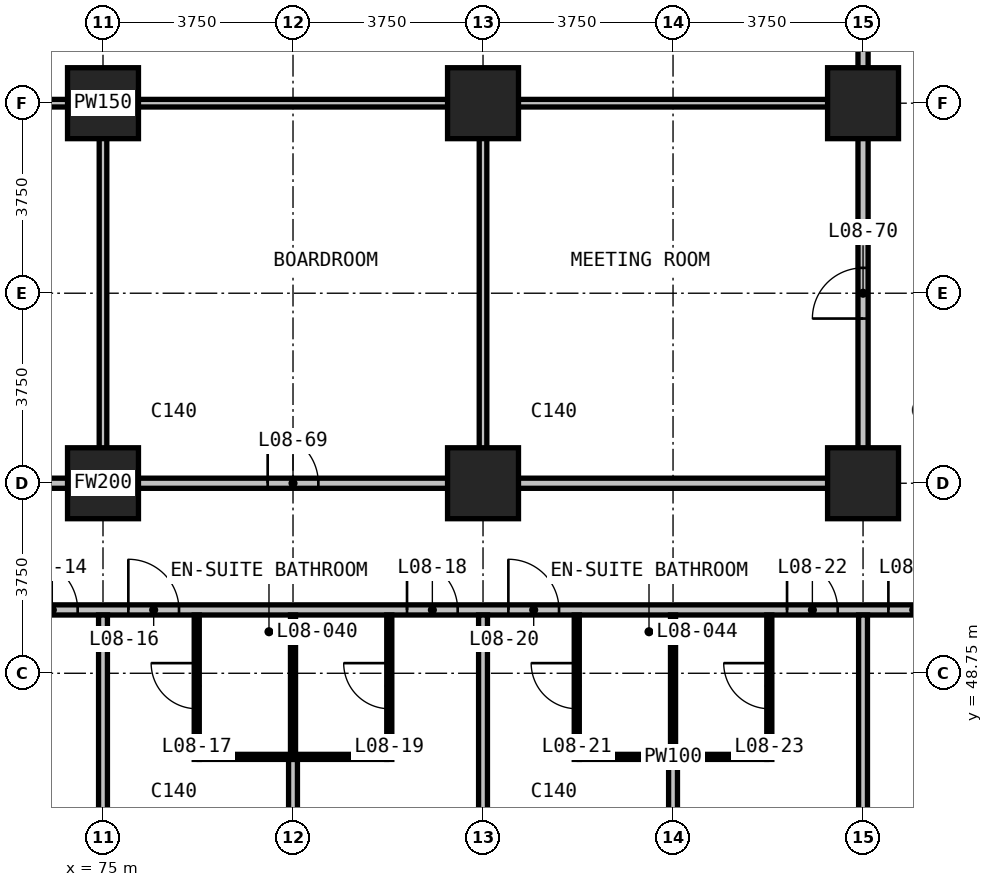
"""IFC4 building model, lengths in metres.
Left out: names, types, materials, properties, quantities, classifications, styles, units other than length and angle.
Written with IfcOpenShell. Run it as: python <this file> out.ifc"""

import sys

from ifc_helpers import new_model, si_unit, direction, frame, frame_2d, origin, origin_2d, place, context, subcontext, project, spatial, rectangle, extrude, element, fill, save


model = new_model("IFC4")
c1 = context("Model", 3, precision=1e-05, world=origin(), true_north=direction((0.0, 1.0)))
c2 = subcontext(c1, "Body", "Model", "MODEL_VIEW")
j1 = project(units=[si_unit("LENGTHUNIT", "METRE"), si_unit("PLANEANGLEUNIT", "RADIAN")], contexts=[c1])
p1 = place(None, origin())
s1 = spatial("IfcSite", under=j1, at=p1, CompositionType="ELEMENT")
p2 = place(p1, origin())
s2 = spatial("IfcBuilding", under=s1, at=p2, CompositionType="ELEMENT")
p3 = place(p2, frame((0.0, 0.0, 46.1)))
s3 = spatial("IfcBuildingStorey", under=s2, at=p3, CompositionType="ELEMENT", Elevation=46.1)
for number, where, z_axis, x_axis in (
    (1, (75.0, 52.5, 0.0), (0.0, 0.0, 1.0), (1.0, 0.0, 0.0)),
    (2, (75.0, 60.0, 0.0), (0.0, 0.0, 1.0), (1.0, 0.0, 0.0)),
    (3, (82.5, 52.5, 0.0), (0.0, 0.0, 1.0), (1.0, 0.0, 0.0)),
    (4, (82.5, 60.0, 0.0), (0.0, 0.0, 1.0), (1.0, 0.0, 0.0)),
    (5, (90.0, 52.5, 0.0), (0.0, 0.0, 1.0), (1.0, 0.0, 0.0)),
    (6, (90.0, 60.0, 0.0), (0.0, 0.0, 1.0), (1.0, 0.0, 0.0)),
):
    element("IfcColumn", number, at=place(p3, frame(where, z_axis=z_axis, x_axis=x_axis)), inside=s3, PredefinedType="COLUMN", context=c2, shape_type="SweptSolid", body=[
        extrude(rectangle(XDim=1.4, YDim=1.4, at=origin_2d()), origin(), (0.0, 0.0, 1.0), 3.3),
    ])
p4 = place(p3, frame((52.575, 50.0, 0.0), z_axis=(0.0, 0.0, 1.0), x_axis=(1.0, 0.0, 0.0)))
e7 = element("IfcWall", 7, at=p4, inside=s3, PredefinedType="PARTITIONING", context=c2, shape_type="SweptSolid", body=[
    extrude(rectangle(XDim=44.85, YDim=0.2, at=frame_2d((22.425, 0.0))), origin(), (0.0, 0.0, 1.0), 3.0),
])
p5 = place(p4, frame((5.925, 0.0, 0.0)))
e8 = element("IfcOpeningElement", 8, at=p5, cuts=e7, PredefinedType="OPENING", context=c2, shape_type="SweptSolid", body=[
    extrude(rectangle(XDim=1.0, YDim=2.2, at=frame_2d((0.5, 1.1))), frame((0.0, 0.11, 0.0), z_axis=(0.0, -1.0, 0.0), x_axis=(1.0, 0.0, 0.0)), (0.0, 0.0, 1.0), 0.22),
])
p6 = place(p4, frame((7.925, 0.0, 0.0)))
e9 = element("IfcOpeningElement", 9, at=p6, cuts=e7, PredefinedType="OPENING", context=c2, shape_type="SweptSolid", body=[
    extrude(rectangle(XDim=1.0, YDim=2.2, at=frame_2d((0.5, 1.1))), frame((0.0, 0.11, 0.0), z_axis=(0.0, -1.0, 0.0), x_axis=(1.0, 0.0, 0.0)), (0.0, 0.0, 1.0), 0.22),
])
p7 = place(p4, frame((13.425, 0.0, 0.0)))
e10 = element("IfcOpeningElement", 10, at=p7, cuts=e7, PredefinedType="OPENING", context=c2, shape_type="SweptSolid", body=[
    extrude(rectangle(XDim=1.0, YDim=2.2, at=frame_2d((0.5, 1.1))), frame((0.0, 0.11, 0.0), z_axis=(0.0, -1.0, 0.0), x_axis=(1.0, 0.0, 0.0)), (0.0, 0.0, 1.0), 0.22),
])
p8 = place(p4, frame((15.425, 0.0, 0.0)))
e11 = element("IfcOpeningElement", 11, at=p8, cuts=e7, PredefinedType="OPENING", context=c2, shape_type="SweptSolid", body=[
    extrude(rectangle(XDim=1.0, YDim=2.2, at=frame_2d((0.5, 1.1))), frame((0.0, 0.11, 0.0), z_axis=(0.0, -1.0, 0.0), x_axis=(1.0, 0.0, 0.0)), (0.0, 0.0, 1.0), 0.22),
])
p9 = place(p4, frame((20.925, 0.0, 0.0)))
e12 = element("IfcOpeningElement", 12, at=p9, cuts=e7, PredefinedType="OPENING", context=c2, shape_type="SweptSolid", body=[
    extrude(rectangle(XDim=1.0, YDim=2.2, at=frame_2d((0.5, 1.1))), frame((0.0, 0.11, 0.0), z_axis=(0.0, -1.0, 0.0), x_axis=(1.0, 0.0, 0.0)), (0.0, 0.0, 1.0), 0.22),
])
p10 = place(p4, frame((22.925, 0.0, 0.0)))
e13 = element("IfcOpeningElement", 13, at=p10, cuts=e7, PredefinedType="OPENING", context=c2, shape_type="SweptSolid", body=[
    extrude(rectangle(XDim=1.0, YDim=2.2, at=frame_2d((0.5, 1.1))), frame((0.0, 0.11, 0.0), z_axis=(0.0, -1.0, 0.0), x_axis=(1.0, 0.0, 0.0)), (0.0, 0.0, 1.0), 0.22),
])
p11 = place(p4, frame((28.425, 0.0, 0.0)))
e14 = element("IfcOpeningElement", 14, at=p11, cuts=e7, PredefinedType="OPENING", context=c2, shape_type="SweptSolid", body=[
    extrude(rectangle(XDim=1.0, YDim=2.2, at=frame_2d((0.5, 1.1))), frame((0.0, 0.11, 0.0), z_axis=(0.0, -1.0, 0.0), x_axis=(1.0, 0.0, 0.0)), (0.0, 0.0, 1.0), 0.22),
])
p12 = place(p4, frame((30.425, 0.0, 0.0)))
e15 = element("IfcOpeningElement", 15, at=p12, cuts=e7, PredefinedType="OPENING", context=c2, shape_type="SweptSolid", body=[
    extrude(rectangle(XDim=1.0, YDim=2.2, at=frame_2d((0.5, 1.1))), frame((0.0, 0.11, 0.0), z_axis=(0.0, -1.0, 0.0), x_axis=(1.0, 0.0, 0.0)), (0.0, 0.0, 1.0), 0.22),
])
p13 = place(p4, frame((35.925, 0.0, 0.0)))
e16 = element("IfcOpeningElement", 16, at=p13, cuts=e7, PredefinedType="OPENING", context=c2, shape_type="SweptSolid", body=[
    extrude(rectangle(XDim=1.0, YDim=2.2, at=frame_2d((0.5, 1.1))), frame((0.0, 0.11, 0.0), z_axis=(0.0, -1.0, 0.0), x_axis=(1.0, 0.0, 0.0)), (0.0, 0.0, 1.0), 0.22),
])
p14 = place(p4, frame((37.925, 0.0, 0.0)))
e17 = element("IfcOpeningElement", 17, at=p14, cuts=e7, PredefinedType="OPENING", context=c2, shape_type="SweptSolid", body=[
    extrude(rectangle(XDim=1.0, YDim=2.2, at=frame_2d((0.5, 1.1))), frame((0.0, 0.11, 0.0), z_axis=(0.0, -1.0, 0.0), x_axis=(1.0, 0.0, 0.0)), (0.0, 0.0, 1.0), 0.22),
])
p15 = place(p4, frame((1.4, 0.0, 0.0)))
e18 = element("IfcOpeningElement", 18, at=p15, cuts=e7, PredefinedType="OPENING", context=c2, shape_type="SweptSolid", body=[
    extrude(rectangle(XDim=0.9, YDim=2.2, at=frame_2d((0.45, 1.1))), frame((0.0, 0.11, 0.0), z_axis=(0.0, -1.0, 0.0), x_axis=(1.0, 0.0, 0.0)), (0.0, 0.0, 1.0), 0.22),
])
p16 = place(p4, frame((42.575, 0.0, 0.0)))
e19 = element("IfcOpeningElement", 19, at=p16, cuts=e7, PredefinedType="OPENING", context=c2, shape_type="SweptSolid", body=[
    extrude(rectangle(XDim=0.9, YDim=2.2, at=frame_2d((0.45, 1.1))), frame((0.0, 0.11, 0.0), z_axis=(0.0, -1.0, 0.0), x_axis=(1.0, 0.0, 0.0)), (0.0, 0.0, 1.0), 0.22),
])
p17 = place(p3, frame((60.1, 52.5, 0.0), z_axis=(0.0, 0.0, 1.0), x_axis=(1.0, 0.0, 0.0)))
e20 = element("IfcWall", 20, at=p17, inside=s3, PredefinedType="PARTITIONING", context=c2, shape_type="SweptSolid", body=[
    extrude(rectangle(XDim=29.8, YDim=0.2, at=frame_2d((14.9, 0.0))), origin(), (0.0, 0.0, 1.0), 3.0),
])
p18 = place(p17, frame((10.65, 0.0, 0.0)))
e21 = element("IfcOpeningElement", 21, at=p18, cuts=e20, PredefinedType="OPENING", context=c2, shape_type="SweptSolid", body=[
    extrude(rectangle(XDim=1.0, YDim=2.2, at=frame_2d((0.5, 1.1))), frame((0.0, 0.11, 0.0), z_axis=(0.0, -1.0, 0.0), x_axis=(1.0, 0.0, 0.0)), (0.0, 0.0, 1.0), 0.22),
])
p19 = place(p17, frame((18.15, 0.0, 0.0)))
e22 = element("IfcOpeningElement", 22, at=p19, cuts=e20, PredefinedType="OPENING", context=c2, shape_type="SweptSolid", body=[
    extrude(rectangle(XDim=1.0, YDim=2.2, at=frame_2d((0.5, 1.1))), frame((0.0, 0.11, 0.0), z_axis=(0.0, -1.0, 0.0), x_axis=(1.0, 0.0, 0.0)), (0.0, 0.0, 1.0), 0.22),
])
p20 = place(p3, frame((90.0, 52.4, 0.0), z_axis=(0.0, 0.0, 1.0), x_axis=(0.0, 1.0, 0.0)))
e23 = element("IfcWall", 23, at=p20, inside=s3, PredefinedType="PARTITIONING", context=c2, shape_type="SweptSolid", body=[
    extrude(rectangle(XDim=18.84, YDim=0.2, at=frame_2d((9.42, 0.0))), origin(), (0.0, 0.0, 1.0), 3.0),
])
p21 = place(p20, frame((3.35, 0.0, 0.0)))
e24 = element("IfcOpeningElement", 24, at=p21, cuts=e23, PredefinedType="OPENING", context=c2, shape_type="SweptSolid", body=[
    extrude(rectangle(XDim=1.0, YDim=2.2, at=frame_2d((0.5, 1.1))), frame((0.0, 0.11, 0.0), z_axis=(0.0, -1.0, 0.0), x_axis=(1.0, 0.0, 0.0)), (0.0, 0.0, 1.0), 0.22),
])
p22 = place(p20, frame((12.3, 0.0, 0.0)))
e25 = element("IfcOpeningElement", 25, at=p22, cuts=e23, PredefinedType="OPENING", context=c2, shape_type="SweptSolid", body=[
    extrude(rectangle(XDim=1.8, YDim=2.2, at=frame_2d((0.9, 1.1))), frame((0.0, 0.11, 0.0), z_axis=(0.0, -1.0, 0.0), x_axis=(1.0, 0.0, 0.0)), (0.0, 0.0, 1.0), 0.22),
])
p23 = place(p3, frame((75.0, 40.485, 0.0), z_axis=(0.0, 0.0, 1.0), x_axis=(0.0, 1.0, 0.0)))
e26 = element("IfcWall", 26, at=p23, inside=s3, PredefinedType="PARTITIONING", context=c2, shape_type="SweptSolid", body=[
    extrude(rectangle(XDim=9.415, YDim=0.175, at=frame_2d((4.708, 0.0))), origin(), (0.0, 0.0, 1.0), 3.0),
])
p24 = place(p3, frame((78.75, 40.485, 0.0), z_axis=(0.0, 0.0, 1.0), x_axis=(0.0, 1.0, 0.0)))
e27 = element("IfcWall", 27, at=p24, inside=s3, PredefinedType="PARTITIONING", context=c2, shape_type="SweptSolid", body=[
    extrude(rectangle(XDim=6.565, YDim=0.175, at=frame_2d((3.282, 0.0))), origin(), (0.0, 0.0, 1.0), 3.0),
])
p25 = place(p3, frame((82.5, 40.485, 0.0), z_axis=(0.0, 0.0, 1.0), x_axis=(0.0, 1.0, 0.0)))
e28 = element("IfcWall", 28, at=p25, inside=s3, PredefinedType="PARTITIONING", context=c2, shape_type="SweptSolid", body=[
    extrude(rectangle(XDim=9.415, YDim=0.175, at=frame_2d((4.708, 0.0))), origin(), (0.0, 0.0, 1.0), 3.0),
])
p26 = place(p3, frame((86.25, 40.485, 0.0), z_axis=(0.0, 0.0, 1.0), x_axis=(0.0, 1.0, 0.0)))
e29 = element("IfcWall", 29, at=p26, inside=s3, PredefinedType="PARTITIONING", context=c2, shape_type="SweptSolid", body=[
    extrude(rectangle(XDim=6.565, YDim=0.175, at=frame_2d((3.282, 0.0))), origin(), (0.0, 0.0, 1.0), 3.0),
])
p27 = place(p3, frame((90.0, 40.485, 0.0), z_axis=(0.0, 0.0, 1.0), x_axis=(0.0, 1.0, 0.0)))
e30 = element("IfcWall", 30, at=p27, inside=s3, PredefinedType="PARTITIONING", context=c2, shape_type="SweptSolid", body=[
    extrude(rectangle(XDim=9.415, YDim=0.175, at=frame_2d((4.708, 0.0))), origin(), (0.0, 0.0, 1.0), 3.0),
])
p28 = place(p3, frame((60.1, 60.0, 0.0), z_axis=(0.0, 0.0, 1.0), x_axis=(1.0, 0.0, 0.0)))
e31 = element("IfcWall", 31, at=p28, inside=s3, PredefinedType="PARTITIONING", context=c2, shape_type="SweptSolid", body=[
    extrude(rectangle(XDim=29.8, YDim=0.15, at=frame_2d((14.9, 0.0))), origin(), (0.0, 0.0, 1.0), 3.0),
])
for number, where, z_axis, x_axis in (
    (32, (75.0, 52.6, 0.0), (0.0, 0.0, 1.0), (0.0, 1.0, 0.0)),
    (33, (82.5, 52.6, 0.0), (0.0, 0.0, 1.0), (0.0, 1.0, 0.0)),
):
    element("IfcWall", number, at=place(p3, frame(where, z_axis=z_axis, x_axis=x_axis)), inside=s3, PredefinedType="PARTITIONING", context=c2, shape_type="SweptSolid", body=[
        extrude(rectangle(XDim=7.325, YDim=0.15, at=frame_2d((3.663, 0.0))), origin(), (0.0, 0.0, 1.0), 3.0),
    ])
for number, where, z_axis, x_axis in (
    (34, (76.9, 47.1, 0.0), (0.0, 0.0, 1.0), (1.0, 0.0, 0.0)),
    (35, (84.4, 47.1, 0.0), (0.0, 0.0, 1.0), (1.0, 0.0, 0.0)),
):
    element("IfcWall", number, at=place(p3, frame(where, z_axis=z_axis, x_axis=x_axis)), inside=s3, PredefinedType="PARTITIONING", context=c2, shape_type="SweptSolid", body=[
        extrude(rectangle(XDim=3.7, YDim=0.1, at=frame_2d((1.85, 0.0))), origin(), (0.0, 0.0, 1.0), 3.0),
    ])
p29 = place(p3, frame((76.85, 47.05, 0.0), z_axis=(0.0, 0.0, 1.0), x_axis=(0.0, 1.0, 0.0)))
e36 = element("IfcWall", 36, at=p29, inside=s3, PredefinedType="PARTITIONING", context=c2, shape_type="SweptSolid", body=[
    extrude(rectangle(XDim=2.85, YDim=0.1, at=frame_2d((1.425, 0.0))), origin(), (0.0, 0.0, 1.0), 3.0),
])
p30 = place(p29, frame((1.0, 0.0, 0.0)))
e37 = element("IfcOpeningElement", 37, at=p30, cuts=e36, PredefinedType="OPENING", context=c2, shape_type="SweptSolid", body=[
    extrude(rectangle(XDim=0.9, YDim=2.2, at=frame_2d((0.45, 1.1))), frame((0.0, 0.06, 0.0), z_axis=(0.0, -1.0, 0.0), x_axis=(1.0, 0.0, 0.0)), (0.0, 0.0, 1.0), 0.12),
])
p31 = place(p3, frame((78.75, 47.15, 0.0), z_axis=(0.0, 0.0, 1.0), x_axis=(0.0, 1.0, 0.0)))
e38 = element("IfcWall", 38, at=p31, inside=s3, PredefinedType="PARTITIONING", context=c2, shape_type="SweptSolid", body=[
    extrude(rectangle(XDim=2.75, YDim=0.1, at=frame_2d((1.375, 0.0))), origin(), (0.0, 0.0, 1.0), 3.0),
])
p32 = place(p3, frame((80.65, 47.05, 0.0), z_axis=(0.0, 0.0, 1.0), x_axis=(0.0, 1.0, 0.0)))
e39 = element("IfcWall", 39, at=p32, inside=s3, PredefinedType="PARTITIONING", context=c2, shape_type="SweptSolid", body=[
    extrude(rectangle(XDim=2.85, YDim=0.1, at=frame_2d((1.425, 0.0))), origin(), (0.0, 0.0, 1.0), 3.0),
])
p33 = place(p32, frame((1.0, 0.0, 0.0)))
e40 = element("IfcOpeningElement", 40, at=p33, cuts=e39, PredefinedType="OPENING", context=c2, shape_type="SweptSolid", body=[
    extrude(rectangle(XDim=0.9, YDim=2.2, at=frame_2d((0.45, 1.1))), frame((0.0, 0.06, 0.0), z_axis=(0.0, -1.0, 0.0), x_axis=(1.0, 0.0, 0.0)), (0.0, 0.0, 1.0), 0.12),
])
p34 = place(p3, frame((84.35, 47.05, 0.0), z_axis=(0.0, 0.0, 1.0), x_axis=(0.0, 1.0, 0.0)))
e41 = element("IfcWall", 41, at=p34, inside=s3, PredefinedType="PARTITIONING", context=c2, shape_type="SweptSolid", body=[
    extrude(rectangle(XDim=2.85, YDim=0.1, at=frame_2d((1.425, 0.0))), origin(), (0.0, 0.0, 1.0), 3.0),
])
p35 = place(p34, frame((1.0, 0.0, 0.0)))
e42 = element("IfcOpeningElement", 42, at=p35, cuts=e41, PredefinedType="OPENING", context=c2, shape_type="SweptSolid", body=[
    extrude(rectangle(XDim=0.9, YDim=2.2, at=frame_2d((0.45, 1.1))), frame((0.0, 0.06, 0.0), z_axis=(0.0, -1.0, 0.0), x_axis=(1.0, 0.0, 0.0)), (0.0, 0.0, 1.0), 0.12),
])
p36 = place(p3, frame((86.25, 47.15, 0.0), z_axis=(0.0, 0.0, 1.0), x_axis=(0.0, 1.0, 0.0)))
e43 = element("IfcWall", 43, at=p36, inside=s3, PredefinedType="PARTITIONING", context=c2, shape_type="SweptSolid", body=[
    extrude(rectangle(XDim=2.75, YDim=0.1, at=frame_2d((1.375, 0.0))), origin(), (0.0, 0.0, 1.0), 3.0),
])
p37 = place(p3, frame((88.15, 47.05, 0.0), z_axis=(0.0, 0.0, 1.0), x_axis=(0.0, 1.0, 0.0)))
e44 = element("IfcWall", 44, at=p37, inside=s3, PredefinedType="PARTITIONING", context=c2, shape_type="SweptSolid", body=[
    extrude(rectangle(XDim=2.85, YDim=0.1, at=frame_2d((1.425, 0.0))), origin(), (0.0, 0.0, 1.0), 3.0),
])
p38 = place(p37, frame((1.0, 0.0, 0.0)))
e45 = element("IfcOpeningElement", 45, at=p38, cuts=e44, PredefinedType="OPENING", context=c2, shape_type="SweptSolid", body=[
    extrude(rectangle(XDim=0.9, YDim=2.2, at=frame_2d((0.45, 1.1))), frame((0.0, 0.06, 0.0), z_axis=(0.0, -1.0, 0.0), x_axis=(1.0, 0.0, 0.0)), (0.0, 0.0, 1.0), 0.12),
])
p39 = place(p9, origin())
e46 = element("IfcDoor", 46, at=p39, inside=s3, OperationType="SINGLE_SWING_LEFT", PredefinedType="DOOR", context=c2, shape_type="SweptSolid", body=[
    extrude(rectangle(XDim=1.0, YDim=2.2, at=frame_2d((0.5, 1.1))), frame((0.0, 0.025, 0.0), z_axis=(0.0, -1.0, 0.0), x_axis=(1.0, 0.0, 0.0)), (0.0, 0.0, 1.0), 0.05),
])
fill(e12, e46)
p40 = place(p10, origin())
e47 = element("IfcDoor", 47, at=p40, inside=s3, OperationType="SINGLE_SWING_LEFT", PredefinedType="DOOR", context=c2, shape_type="SweptSolid", body=[
    extrude(rectangle(XDim=1.0, YDim=2.2, at=frame_2d((0.5, 1.1))), frame((0.0, 0.025, 0.0), z_axis=(0.0, -1.0, 0.0), x_axis=(1.0, 0.0, 0.0)), (0.0, 0.0, 1.0), 0.05),
])
fill(e13, e47)
p41 = place(p30, origin())
e48 = element("IfcDoor", 48, at=p41, inside=s3, OperationType="SINGLE_SWING_RIGHT", PredefinedType="DOOR", context=c2, shape_type="SweptSolid", body=[
    extrude(rectangle(XDim=0.9, YDim=2.2, at=frame_2d((0.45, 1.1))), frame((0.0, 0.025, 0.0), z_axis=(0.0, -1.0, 0.0), x_axis=(1.0, 0.0, 0.0)), (0.0, 0.0, 1.0), 0.05),
])
fill(e37, e48)
p42 = place(p11, origin())
e49 = element("IfcDoor", 49, at=p42, inside=s3, OperationType="SINGLE_SWING_LEFT", PredefinedType="DOOR", context=c2, shape_type="SweptSolid", body=[
    extrude(rectangle(XDim=1.0, YDim=2.2, at=frame_2d((0.5, 1.1))), frame((0.0, 0.025, 0.0), z_axis=(0.0, -1.0, 0.0), x_axis=(1.0, 0.0, 0.0)), (0.0, 0.0, 1.0), 0.05),
])
fill(e14, e49)
p43 = place(p33, origin())
e50 = element("IfcDoor", 50, at=p43, inside=s3, OperationType="SINGLE_SWING_RIGHT", PredefinedType="DOOR", context=c2, shape_type="SweptSolid", body=[
    extrude(rectangle(XDim=0.9, YDim=2.2, at=frame_2d((0.45, 1.1))), frame((0.0, 0.025, 0.0), z_axis=(0.0, -1.0, 0.0), x_axis=(1.0, 0.0, 0.0)), (0.0, 0.0, 1.0), 0.05),
])
fill(e40, e50)
p44 = place(p12, origin())
e51 = element("IfcDoor", 51, at=p44, inside=s3, OperationType="SINGLE_SWING_RIGHT", PredefinedType="DOOR", context=c2, shape_type="SweptSolid", body=[
    extrude(rectangle(XDim=1.0, YDim=2.2, at=frame_2d((0.5, 1.1))), frame((0.0, 0.025, 0.0), z_axis=(0.0, -1.0, 0.0), x_axis=(1.0, 0.0, 0.0)), (0.0, 0.0, 1.0), 0.05),
])
fill(e15, e51)
p45 = place(p35, origin())
e52 = element("IfcDoor", 52, at=p45, inside=s3, OperationType="SINGLE_SWING_RIGHT", PredefinedType="DOOR", context=c2, shape_type="SweptSolid", body=[
    extrude(rectangle(XDim=0.9, YDim=2.2, at=frame_2d((0.45, 1.1))), frame((0.0, 0.025, 0.0), z_axis=(0.0, -1.0, 0.0), x_axis=(1.0, 0.0, 0.0)), (0.0, 0.0, 1.0), 0.05),
])
fill(e42, e52)
p46 = place(p13, origin())
e53 = element("IfcDoor", 53, at=p46, inside=s3, OperationType="SINGLE_SWING_RIGHT", PredefinedType="DOOR", context=c2, shape_type="SweptSolid", body=[
    extrude(rectangle(XDim=1.0, YDim=2.2, at=frame_2d((0.5, 1.1))), frame((0.0, 0.025, 0.0), z_axis=(0.0, -1.0, 0.0), x_axis=(1.0, 0.0, 0.0)), (0.0, 0.0, 1.0), 0.05),
])
fill(e16, e53)
p47 = place(p38, origin())
e54 = element("IfcDoor", 54, at=p47, inside=s3, OperationType="SINGLE_SWING_RIGHT", PredefinedType="DOOR", context=c2, shape_type="SweptSolid", body=[
    extrude(rectangle(XDim=0.9, YDim=2.2, at=frame_2d((0.45, 1.1))), frame((0.0, 0.025, 0.0), z_axis=(0.0, -1.0, 0.0), x_axis=(1.0, 0.0, 0.0)), (0.0, 0.0, 1.0), 0.05),
])
fill(e45, e54)
p48 = place(p14, origin())
e55 = element("IfcDoor", 55, at=p48, inside=s3, OperationType="SINGLE_SWING_LEFT", PredefinedType="DOOR", context=c2, shape_type="SweptSolid", body=[
    extrude(rectangle(XDim=1.0, YDim=2.2, at=frame_2d((0.5, 1.1))), frame((0.0, 0.025, 0.0), z_axis=(0.0, -1.0, 0.0), x_axis=(1.0, 0.0, 0.0)), (0.0, 0.0, 1.0), 0.05),
])
fill(e17, e55)
p49 = place(p19, origin())
e56 = element("IfcDoor", 56, at=p49, inside=s3, OperationType="SINGLE_SWING_LEFT", PredefinedType="DOOR", context=c2, shape_type="SweptSolid", body=[
    extrude(rectangle(XDim=1.0, YDim=2.2, at=frame_2d((0.5, 1.1))), frame((0.0, 0.025, 0.0), z_axis=(0.0, -1.0, 0.0), x_axis=(1.0, 0.0, 0.0)), (0.0, 0.0, 1.0), 0.05),
])
fill(e22, e56)
p50 = place(p21, origin())
e57 = element("IfcDoor", 57, at=p50, inside=s3, OperationType="SINGLE_SWING_LEFT", PredefinedType="DOOR", context=c2, shape_type="SweptSolid", body=[
    extrude(rectangle(XDim=1.0, YDim=2.2, at=frame_2d((0.5, 1.1))), frame((0.0, 0.025, 0.0), z_axis=(0.0, -1.0, 0.0), x_axis=(1.0, 0.0, 0.0)), (0.0, 0.0, 1.0), 0.05),
])
fill(e24, e57)
save(model, sys.argv[1])
